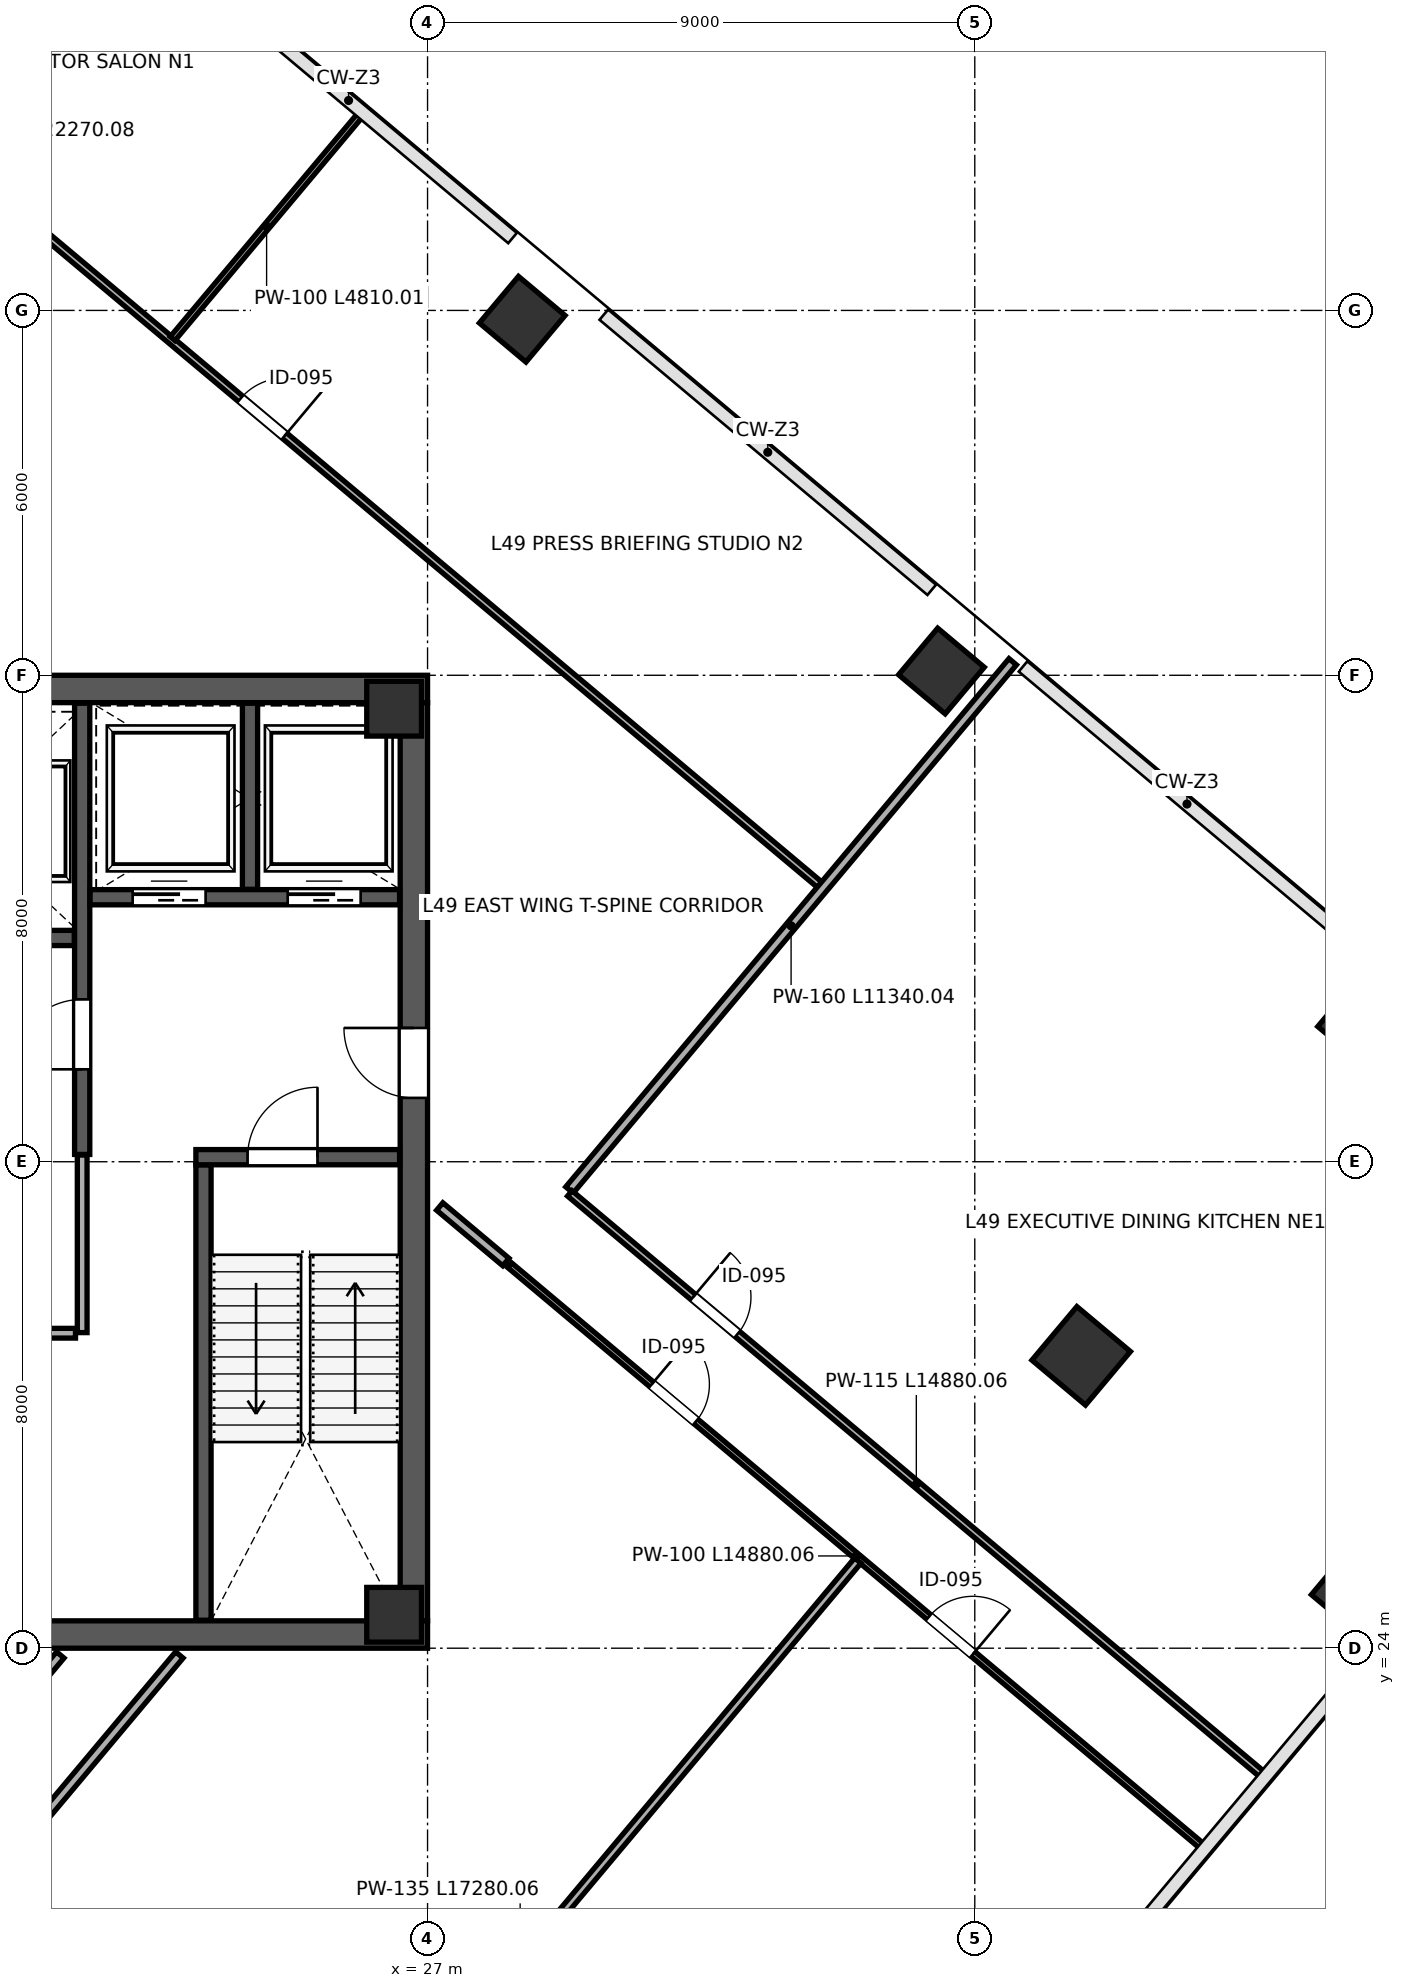
"""IFC4 building model, lengths in metres.
Left out: names, types, materials, properties, quantities, classifications, styles, units other than length and angle.
Written with IfcOpenShell. Run it as: python <this file> out.ifc"""

import sys

from ifc_helpers import new_model, si_unit, direction, frame, frame_2d, origin, origin_2d, place, context, subcontext, project, spatial, rectangle, extrude, source, transform, mapped, element, fill, save


model = new_model("IFC4")
c1 = context("Model", 3, precision=1e-05, world=origin(), true_north=direction((0.0, 1.0)))
c2 = subcontext(c1, "Body", "Model", "MODEL_VIEW")
j1 = project(units=[si_unit("LENGTHUNIT", "METRE"), si_unit("PLANEANGLEUNIT", "RADIAN")], contexts=[c1])
p1 = place(None, origin())
s1 = spatial("IfcSite", under=j1, at=p1, CompositionType="ELEMENT")
p2 = place(p1, origin())
s2 = spatial("IfcBuilding", under=s1, at=p2, CompositionType="ELEMENT")
p3 = place(p2, frame((0.0, 0.0, 220.6)))
s3 = spatial("IfcBuildingStorey", under=s2, at=p3, CompositionType="ELEMENT", Elevation=220.6)
m1 = source(origin(), c2, "Body", "SweptSolid", [
    extrude(rectangle(XDim=0.9, YDim=0.9, at=origin_2d()), origin(), (0.0, 0.0, 1.0), 4.198),
])
for number, where, z_axis, x_axis in (
    (1, (26.45, 24.55, 0.001), (0.0, 0.0, 1.0), (1.0, 0.0, 0.0)),
    (2, (26.45, 39.45, 0.001), (0.0, 0.0, 1.0), (1.0, 0.0, 0.0)),
):
    element("IfcColumn", number, at=place(p3, frame(where, z_axis=z_axis, x_axis=x_axis)), inside=s3, PredefinedType="COLUMN", context=c2, shape_type="MappedRepresentation", body=[
        mapped(m1, transform((0.0, 0.0, 0.0), scale=1.0)),
    ])
m2 = source(origin(), c2, "Body", "SweptSolid", [
    extrude(rectangle(XDim=1.0, YDim=1.0, at=origin_2d()), origin(), (0.0, 0.0, 1.0), 4.198),
])
for number, where, z_axis, x_axis in (
    (3, (28.557, 45.855, 0.001), (0.0, 0.0, 1.0), (-0.766, 0.643, 0.0)),
    (4, (35.451, 40.07, 0.001), (0.0, 0.0, 1.0), (-0.766, 0.643, 0.0)),
):
    element("IfcColumn", number, at=place(p3, frame(where, z_axis=z_axis, x_axis=x_axis)), inside=s3, PredefinedType="COLUMN", context=c2, shape_type="MappedRepresentation", body=[
        mapped(m2, transform((0.0, 0.0, 0.0), scale=1.0)),
    ])
m3 = source(origin(), c2, "Body", "SweptSolid", [
    extrude(rectangle(XDim=1.15, YDim=1.15, at=origin_2d()), origin(), (0.0, 0.0, 1.0), 4.198),
])
p4 = place(p3, frame((37.75, 28.808, 0.001), z_axis=(0.0, 0.0, 1.0), x_axis=(-0.766044443119, 0.642787609687, 0.0)))
e5 = element("IfcColumn", 5, at=p4, inside=s3, PredefinedType="COLUMN", context=c2, shape_type="MappedRepresentation", body=[
    mapped(m3, transform((0.0, 0.0, 0.0), scale=1.0)),
])
p5 = place(p3, frame((42.346, 34.285, 0.001), z_axis=(0.0, 0.0, 1.0), x_axis=(-0.766044443119, 0.642787609687, 0.0)))
e6 = element("IfcColumn", 6, at=p5, inside=s3, PredefinedType="COLUMN", context=c2, shape_type="MappedRepresentation", body=[
    mapped(m2, transform((0.0, 0.0, 0.0), scale=1.0)),
])
m4 = source(origin(), c2, "Body", "SweptSolid", [
    extrude(rectangle(XDim=1.15, YDim=1.15, at=origin_2d()), origin(), (0.0, 0.0, 1.0), 4.198),
])
p6 = place(p3, frame((42.346, 24.951, 0.001), z_axis=(0.0, 0.0, 1.0), x_axis=(-0.766044443119, 0.642787609687, 0.0)))
e7 = element("IfcColumn", 7, at=p6, inside=s3, PredefinedType="COLUMN", context=c2, shape_type="MappedRepresentation", body=[
    mapped(m4, transform((0.0, 0.0, 0.0), scale=1.0)),
])
p7 = place(p3, frame((26.775, 24.45, 0.0), z_axis=(0.0, 0.0, 1.0), x_axis=(0.0, 1.0, 0.0)))
e8 = element("IfcWall", 8, at=p7, inside=s3, PredefinedType="SHEAR", context=c2, shape_type="SweptSolid", body=[
    extrude(rectangle(XDim=15.1, YDim=0.45, at=frame_2d((7.55, 0.0))), origin(), (0.0, 0.0, 1.0), 3.96),
])
p8 = place(p7, frame((8.6, 0.0, 0.0)))
e9 = element("IfcOpeningElement", 9, at=p8, cuts=e8, PredefinedType="OPENING", context=c2, shape_type="SweptSolid", body=[
    extrude(rectangle(XDim=1.15, YDim=2.2, at=frame_2d((0.575, 1.1))), frame((0.0, 0.235, 0.0), z_axis=(0.0, -1.0, 0.0), x_axis=(1.0, 0.0, 0.0)), (0.0, 0.0, 1.0), 0.47),
])
for number, where, z_axis, x_axis in (
    (10, (9.0, 24.225, 0.0), (0.0, 0.0, 1.0), (1.0, 0.0, 0.0)),
    (11, (9.0, 39.775, 0.0), (0.0, 0.0, 1.0), (1.0, 0.0, 0.0)),
):
    element("IfcWall", number, at=place(p3, frame(where, z_axis=z_axis, x_axis=x_axis)), inside=s3, PredefinedType="SHEAR", context=c2, shape_type="SweptSolid", body=[
        extrude(rectangle(XDim=18.0, YDim=0.45, at=frame_2d((9.0, 0.0))), origin(), (0.0, 0.0, 1.0), 3.96),
    ])
p9 = place(p3, frame((23.315, 24.46, 0.0), z_axis=(0.0, 0.0, 1.0), x_axis=(0.0, 1.0, 0.0)))
e12 = element("IfcWall", 12, at=p9, inside=s3, PredefinedType="SHEAR", context=c2, shape_type="SweptSolid", body=[
    extrude(rectangle(XDim=7.49, YDim=0.25, at=frame_2d((3.745, 0.0))), origin(), (0.0, 0.0, 1.0), 3.96),
])
p10 = place(p3, frame((23.19, 32.075, 0.0), z_axis=(0.0, 0.0, 1.0), x_axis=(1.0, 0.0, 0.0)))
e13 = element("IfcWall", 13, at=p10, inside=s3, PredefinedType="SHEAR", context=c2, shape_type="SweptSolid", body=[
    extrude(rectangle(XDim=3.35, YDim=0.25, at=frame_2d((1.675, 0.0))), origin(), (0.0, 0.0, 1.0), 3.96),
])
p11 = place(p10, frame((0.85, 0.0, 0.0)))
e14 = element("IfcOpeningElement", 14, at=p11, cuts=e13, PredefinedType="OPENING", context=c2, shape_type="SweptSolid", body=[
    extrude(rectangle(XDim=1.15, YDim=2.2, at=frame_2d((0.575, 1.1))), frame((0.0, 0.135, 0.0), z_axis=(0.0, -1.0, 0.0), x_axis=(1.0, 0.0, 0.0)), (0.0, 0.0, 1.0), 0.27),
])
p12 = place(p3, frame((21.32, 32.12, 0.0), z_axis=(0.0, 0.0, 1.0), x_axis=(0.0, 1.0, 0.0)))
e15 = element("IfcWall", 15, at=p12, inside=s3, PredefinedType="SHEAR", context=c2, shape_type="SweptSolid", body=[
    extrude(rectangle(XDim=7.42, YDim=0.25, at=frame_2d((3.71, 0.0))), origin(), (0.0, 0.0, 1.0), 3.96),
])
p13 = place(p12, frame((1.4, 0.0, 0.0)))
e16 = element("IfcOpeningElement", 16, at=p13, cuts=e15, PredefinedType="OPENING", context=c2, shape_type="SweptSolid", body=[
    extrude(rectangle(XDim=1.15, YDim=2.2, at=frame_2d((0.575, 1.1))), frame((0.0, 0.135, 0.0), z_axis=(0.0, -1.0, 0.0), x_axis=(1.0, 0.0, 0.0)), (0.0, 0.0, 1.0), 0.27),
])
p14 = place(p3, frame((21.45, 36.35, 0.0), z_axis=(0.0, 0.0, 1.0), x_axis=(1.0, 0.0, 0.0)))
e17 = element("IfcWall", 17, at=p14, inside=s3, PredefinedType="SHEAR", context=c2, shape_type="SweptSolid", body=[
    extrude(rectangle(XDim=5.09, YDim=0.25, at=frame_2d((2.545, 0.0))), origin(), (0.0, 0.0, 1.0), 3.96),
])
p15 = place(p14, frame((0.7, 0.0, 0.0)))
e18 = element("IfcOpeningElement", 18, at=p15, cuts=e17, PredefinedType="OPENING", context=c2, shape_type="SweptSolid", body=[
    extrude(rectangle(XDim=1.2, YDim=2.2, at=frame_2d((0.6, 1.1))), frame((0.0, 0.135, 0.0), z_axis=(0.0, -1.0, 0.0), x_axis=(1.0, 0.0, 0.0)), (0.0, 0.0, 1.0), 0.27),
])
p16 = place(p14, frame((3.25, 0.0, 0.0)))
e19 = element("IfcOpeningElement", 19, at=p16, cuts=e17, PredefinedType="OPENING", context=c2, shape_type="SweptSolid", body=[
    extrude(rectangle(XDim=1.2, YDim=2.2, at=frame_2d((0.6, 1.1))), frame((0.0, 0.135, 0.0), z_axis=(0.0, -1.0, 0.0), x_axis=(1.0, 0.0, 0.0)), (0.0, 0.0, 1.0), 0.27),
])
p17 = place(p3, frame((24.08, 36.48, 0.0), z_axis=(0.0, 0.0, 1.0), x_axis=(0.0, 1.0, 0.0)))
e20 = element("IfcWall", 20, at=p17, inside=s3, PredefinedType="SHEAR", context=c2, shape_type="SweptSolid", body=[
    extrude(rectangle(XDim=3.06, YDim=0.25, at=frame_2d((1.53, 0.0))), origin(), (0.0, 0.0, 1.0), 3.96),
])
p18 = place(p3, frame((17.32, 35.68, 0.0), z_axis=(0.0, 0.0, 1.0), x_axis=(1.0, 0.0, 0.0)))
e21 = element("IfcWall", 21, at=p18, inside=s3, PredefinedType="SHEAR", context=c2, shape_type="SweptSolid", body=[
    extrude(rectangle(XDim=3.87, YDim=0.25, at=frame_2d((1.935, 0.0))), origin(), (0.0, 0.0, 1.0), 3.96),
])
p19 = place(p18, frame((0.45, 0.0, 0.0)))
e22 = element("IfcOpeningElement", 22, at=p19, cuts=e21, PredefinedType="OPENING", context=c2, shape_type="SweptSolid", body=[
    extrude(rectangle(XDim=1.1, YDim=2.2, at=frame_2d((0.55, 1.1))), frame((0.0, 0.135, 0.0), z_axis=(0.0, -1.0, 0.0), x_axis=(1.0, 0.0, 0.0)), (0.0, 0.0, 1.0), 0.27),
])
p20 = place(p18, frame((2.35, 0.0, 0.0)))
e23 = element("IfcOpeningElement", 23, at=p20, cuts=e21, PredefinedType="OPENING", context=c2, shape_type="SweptSolid", body=[
    extrude(rectangle(XDim=1.1, YDim=2.2, at=frame_2d((0.55, 1.1))), frame((0.0, 0.135, 0.0), z_axis=(0.0, -1.0, 0.0), x_axis=(1.0, 0.0, 0.0)), (0.0, 0.0, 1.0), 0.27),
])
p21 = place(p3, frame((12.84, 29.18, 0.0), z_axis=(0.0, 0.0, 1.0), x_axis=(1.0, 0.0, 0.0)))
e24 = element("IfcWall", 24, at=p21, inside=s3, PredefinedType="PARTITIONING", context=c2, shape_type="SweptSolid", body=[
    extrude(rectangle(XDim=8.37, YDim=0.16, at=frame_2d((4.185, 0.0))), origin(), (0.0, 0.0, 1.0), 3.96),
])
p22 = place(p21, frame((2.1, 0.0, 0.0)))
e25 = element("IfcOpeningElement", 25, at=p22, cuts=e24, PredefinedType="OPENING", context=c2, shape_type="SweptSolid", body=[
    extrude(rectangle(XDim=0.9, YDim=2.15, at=frame_2d((0.45, 1.075))), frame((0.0, 0.09, 0.0), z_axis=(0.0, -1.0, 0.0), x_axis=(1.0, 0.0, 0.0)), (0.0, 0.0, 1.0), 0.18),
])
p23 = place(p21, frame((6.2, 0.0, 0.0)))
e26 = element("IfcOpeningElement", 26, at=p23, cuts=e24, PredefinedType="OPENING", context=c2, shape_type="SweptSolid", body=[
    extrude(rectangle(XDim=0.85, YDim=2.1, at=frame_2d((0.425, 1.05))), frame((0.0, 0.09, 0.0), z_axis=(0.0, -1.0, 0.0), x_axis=(1.0, 0.0, 0.0)), (0.0, 0.0, 1.0), 0.18),
])
p24 = place(p3, frame((21.32, 29.19, 0.0), z_axis=(0.0, 0.0, 1.0), x_axis=(0.0, 1.0, 0.0)))
e27 = element("IfcWall", 27, at=p24, inside=s3, PredefinedType="PARTITIONING", context=c2, shape_type="SweptSolid", body=[
    extrude(rectangle(XDim=2.92, YDim=0.16, at=frame_2d((1.46, 0.0))), origin(), (0.0, 0.0, 1.0), 3.96),
])
p25 = place(p3, frame((15.902, 17.861, 0.0), z_axis=(0.0, 0.0, 1.0), x_axis=(0.642774387864, 0.766055537351, 0.0)))
e28 = element("IfcWall", 28, at=p25, inside=s3, PredefinedType="PARTITIONING", context=c2, shape_type="SweptSolid", body=[
    extrude(rectangle(XDim=7.87, YDim=0.16, at=frame_2d((3.935, 0.0))), origin(), (0.0, 0.0, 1.0), 3.96),
])
p26 = place(p3, frame((27.2, 31.264, 0.0), z_axis=(0.0, 0.0, 1.0), x_axis=(0.766046809659, -0.642784789344, 0.0)))
e29 = element("IfcWall", 29, at=p26, inside=s3, PredefinedType="PARTITIONING", context=c2, shape_type="SweptSolid", body=[
    extrude(rectangle(XDim=1.42, YDim=0.16, at=frame_2d((0.71, 0.0))), origin(), (0.0, 0.0, 1.0), 3.96),
])
p27 = place(p3, frame((16.416, 50.848, 0.0), z_axis=(0.0, 0.0, 1.0), x_axis=(0.766043174175, -0.642789121951, 0.0)))
e30 = element("IfcWall", 30, at=p27, inside=s3, PredefinedType="PARTITIONING", context=c2, shape_type="SweptSolid", body=[
    extrude(rectangle(XDim=22.27, YDim=0.115, at=frame_2d((11.135, 0.0))), origin(), (0.0, 0.0, 1.0), 3.96),
])
p28 = place(p27, frame((1.05, 0.0, 0.0)))
e31 = element("IfcOpeningElement", 31, at=p28, cuts=e30, PredefinedType="OPENING", context=c2, shape_type="SweptSolid", body=[
    extrude(rectangle(XDim=0.95, YDim=2.15, at=frame_2d((0.475, 1.075))), frame((0.0, 0.067, 0.0), z_axis=(0.0, -1.0, 0.0), x_axis=(1.0, 0.0, 0.0)), (0.0, 0.0, 1.0), 0.135),
])
p29 = place(p27, frame((9.8, 0.0, 0.0)))
e32 = element("IfcOpeningElement", 32, at=p29, cuts=e30, PredefinedType="OPENING", context=c2, shape_type="SweptSolid", body=[
    extrude(rectangle(XDim=0.95, YDim=2.15, at=frame_2d((0.475, 1.075))), frame((0.0, 0.067, 0.0), z_axis=(0.0, -1.0, 0.0), x_axis=(1.0, 0.0, 0.0)), (0.0, 0.0, 1.0), 0.135),
])
p30 = place(p3, frame((22.807, 45.537, 0.0), z_axis=(0.0, 0.0, 1.0), x_axis=(0.642796794607, 0.766036735961, 0.0)))
e33 = element("IfcWall", 33, at=p30, inside=s3, PredefinedType="PARTITIONING", context=c2, shape_type="SweptSolid", body=[
    extrude(rectangle(XDim=4.81, YDim=0.1, at=frame_2d((2.405, 0.0))), origin(), (0.0, 0.0, 1.0), 3.195),
])
p31 = place(p3, frame((29.334, 31.535, 0.0), z_axis=(0.0, 0.0, 1.0), x_axis=(0.642789592208, 0.766042779581, 0.0)))
e34 = element("IfcWall", 34, at=p31, inside=s3, PredefinedType="PARTITIONING", context=c2, shape_type="SweptSolid", body=[
    extrude(rectangle(XDim=11.34, YDim=0.16, at=frame_2d((5.67, 0.0))), origin(), (0.0, 0.0, 1.0), 3.195),
])
p32 = place(p3, frame((14.743, 14.146, 0.0), z_axis=(0.0, 0.0, 1.0), x_axis=(0.642789996784, 0.7660424401, 0.0)))
e35 = element("IfcWall", 35, at=p32, inside=s3, PredefinedType="PARTITIONING", context=c2, shape_type="SweptSolid", body=[
    extrude(rectangle(XDim=12.719, YDim=0.16, at=frame_2d((6.359, 0.0))), origin(), (0.0, 0.0, 1.0), 3.96),
])
p33 = place(p3, frame((29.339, 31.479, 0.0), z_axis=(0.0, 0.0, 1.0), x_axis=(0.766048981681, -0.6427822008, 0.0)))
e36 = element("IfcWall", 36, at=p33, inside=s3, PredefinedType="PARTITIONING", context=c2, shape_type="SweptSolid", body=[
    extrude(rectangle(XDim=14.88, YDim=0.115, at=frame_2d((7.44, 0.0))), origin(), (0.0, 0.0, 1.0), 3.96),
])
p34 = place(p33, frame((2.65, 0.0, 0.0)))
e37 = element("IfcOpeningElement", 37, at=p34, cuts=e36, PredefinedType="OPENING", context=c2, shape_type="SweptSolid", body=[
    extrude(rectangle(XDim=0.95, YDim=2.15, at=frame_2d((0.475, 1.075))), frame((0.0, 0.067, 0.0), z_axis=(0.0, -1.0, 0.0), x_axis=(1.0, 0.0, 0.0)), (0.0, 0.0, 1.0), 0.135),
])
p35 = place(p3, frame((28.349, 30.3, 0.0), z_axis=(0.0, 0.0, 1.0), x_axis=(0.766042202636, -0.642790279781, 0.0)))
e38 = element("IfcWall", 38, at=p35, inside=s3, PredefinedType="PARTITIONING", context=c2, shape_type="SweptSolid", body=[
    extrude(rectangle(XDim=14.88, YDim=0.1, at=frame_2d((7.44, 0.0))), origin(), (0.0, 0.0, 1.0), 3.96),
])
p36 = place(p35, frame((3.05, 0.0, 0.0)))
e39 = element("IfcOpeningElement", 39, at=p36, cuts=e38, PredefinedType="OPENING", context=c2, shape_type="SweptSolid", body=[
    extrude(rectangle(XDim=0.95, YDim=2.15, at=frame_2d((0.475, 1.075))), frame((0.0, 0.06, 0.0), z_axis=(0.0, -1.0, 0.0), x_axis=(1.0, 0.0, 0.0)), (0.0, 0.0, 1.0), 0.12),
])
p37 = place(p35, frame((9.0, 0.0, 0.0)))
e40 = element("IfcOpeningElement", 40, at=p37, cuts=e38, PredefinedType="OPENING", context=c2, shape_type="SweptSolid", body=[
    extrude(rectangle(XDim=0.95, YDim=2.15, at=frame_2d((0.475, 1.075))), frame((0.0, 0.06, 0.0), z_axis=(0.0, -1.0, 0.0), x_axis=(1.0, 0.0, 0.0)), (0.0, 0.0, 1.0), 0.12),
])
p38 = place(p3, frame((22.969, 12.204, 0.0), z_axis=(0.0, 0.0, 1.0), x_axis=(0.642787758903, 0.766044317912, 0.0)))
e41 = element("IfcWall", 41, at=p38, inside=s3, PredefinedType="PARTITIONING", context=c2, shape_type="SweptSolid", body=[
    extrude(rectangle(XDim=17.28, YDim=0.135, at=frame_2d((8.64, 0.0))), origin(), (0.0, 0.0, 1.0), 3.96),
])
m5 = source(origin(), c2, "Body", "SweptSolid", [
    extrude(rectangle(XDim=1.15, YDim=2.2, at=frame_2d((0.575, 1.1))), frame((0.0, 0.025, 0.0), z_axis=(0.0, -1.0, 0.0), x_axis=(1.0, 0.0, 0.0)), (0.0, 0.0, 1.0), 0.05),
])
p39 = place(p13, origin())
e42 = element("IfcDoor", 42, at=p39, inside=s3, OperationType="SINGLE_SWING_LEFT", PredefinedType="DOOR", context=c2, shape_type="MappedRepresentation", body=[
    mapped(m5, transform((0.0, 0.0, 0.0), scale=1.0)),
])
fill(e16, e42)
m6 = source(origin(), c2, "Body", "SweptSolid", [
    extrude(rectangle(XDim=1.15, YDim=2.2, at=frame_2d((0.575, 1.1))), frame((0.0, 0.025, 0.0), z_axis=(0.0, -1.0, 0.0), x_axis=(1.0, 0.0, 0.0)), (0.0, 0.0, 1.0), 0.05),
])
p40 = place(p11, origin())
e43 = element("IfcDoor", 43, at=p40, inside=s3, OperationType="SINGLE_SWING_RIGHT", PredefinedType="DOOR", context=c2, shape_type="MappedRepresentation", body=[
    mapped(m6, transform((0.0, 0.0, 0.0), scale=1.0)),
])
fill(e14, e43)
p41 = place(p8, origin())
e44 = element("IfcDoor", 44, at=p41, inside=s3, OperationType="SINGLE_SWING_RIGHT", PredefinedType="DOOR", context=c2, shape_type="MappedRepresentation", body=[
    mapped(m5, transform((0.0, 0.0, 0.0), scale=1.0)),
])
fill(e9, e44)
m7 = source(origin(), c2, "Body", "SweptSolid", [
    extrude(rectangle(XDim=1.2, YDim=2.2, at=frame_2d((0.6, 1.1))), frame((0.0, 0.025, 0.0), z_axis=(0.0, -1.0, 0.0), x_axis=(1.0, 0.0, 0.0)), (0.0, 0.0, 1.0), 0.05),
])
p42 = place(p15, origin())
e45 = element("IfcDoor", 45, at=p42, inside=s3, OperationType="SLIDING_TO_LEFT", PredefinedType="DOOR", context=c2, shape_type="MappedRepresentation", body=[
    mapped(m7, transform((0.0, 0.0, 0.0), scale=1.0)),
])
fill(e18, e45)
p43 = place(p16, origin())
e46 = element("IfcDoor", 46, at=p43, inside=s3, OperationType="SLIDING_TO_RIGHT", PredefinedType="DOOR", context=c2, shape_type="MappedRepresentation", body=[
    mapped(m7, transform((0.0, 0.0, 0.0), scale=1.0)),
])
fill(e19, e46)
m8 = source(origin(), c2, "Body", "SweptSolid", [
    extrude(rectangle(XDim=0.95, YDim=2.15, at=frame_2d((0.475, 1.075))), frame((0.0, 0.025, 0.0), z_axis=(0.0, -1.0, 0.0), x_axis=(1.0, 0.0, 0.0)), (0.0, 0.0, 1.0), 0.05),
])
p44 = place(p29, origin())
e47 = element("IfcDoor", 47, at=p44, inside=s3, OperationType="SINGLE_SWING_RIGHT", PredefinedType="DOOR", context=c2, shape_type="MappedRepresentation", body=[
    mapped(m8, transform((0.0, 0.0, 0.0), scale=1.0)),
])
fill(e32, e47)
p45 = place(p34, origin())
e48 = element("IfcDoor", 48, at=p45, inside=s3, OperationType="SINGLE_SWING_LEFT", PredefinedType="DOOR", context=c2, shape_type="MappedRepresentation", body=[
    mapped(m8, transform((0.0, 0.0, 0.0), scale=1.0)),
])
fill(e37, e48)
p46 = place(p36, origin())
e49 = element("IfcDoor", 49, at=p46, inside=s3, OperationType="SINGLE_SWING_LEFT", PredefinedType="DOOR", context=c2, shape_type="MappedRepresentation", body=[
    mapped(m8, transform((0.0, 0.0, 0.0), scale=1.0)),
])
fill(e39, e49)
p47 = place(p37, origin())
e50 = element("IfcDoor", 50, at=p47, inside=s3, OperationType="SINGLE_SWING_RIGHT", PredefinedType="DOOR", context=c2, shape_type="MappedRepresentation", body=[
    mapped(m8, transform((0.0, 0.0, 0.0), scale=1.0)),
])
fill(e40, e50)
save(model, sys.argv[1])
